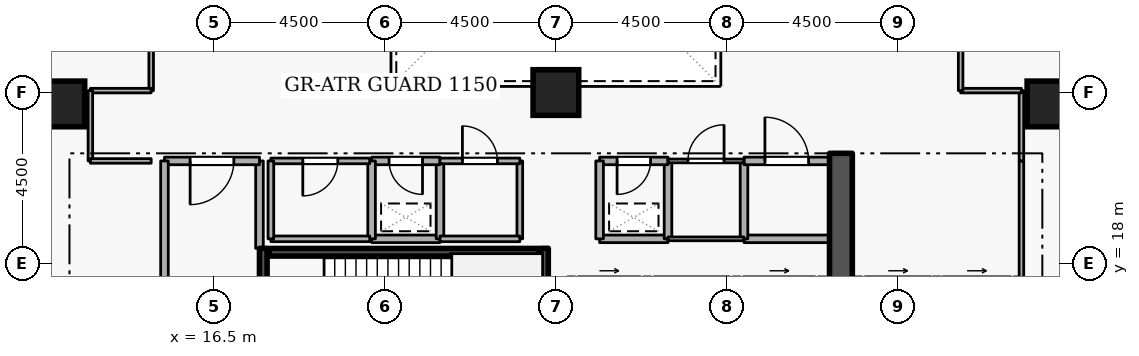
"""IFC4 building model, lengths in metres.
Left out: names, types, materials, properties, quantities, classifications, styles, units other than length and angle.
Written with IfcOpenShell. Run it as: python <this file> out.ifc"""

import sys

from ifc_helpers import new_model, si_unit, direction, frame, frame_2d, origin, origin_2d, place, context, subcontext, project, spatial, rectangle, extrude, element, fill, save


model = new_model("IFC4")
c1 = context("Model", 3, precision=1e-05, world=origin(), true_north=direction((0.0, 1.0)))
c2 = subcontext(c1, "Body", "Model", "MODEL_VIEW")
j1 = project(units=[si_unit("LENGTHUNIT", "METRE"), si_unit("PLANEANGLEUNIT", "RADIAN")], contexts=[c1])
p1 = place(None, origin())
s1 = spatial("IfcSite", under=j1, at=p1, CompositionType="ELEMENT")
p2 = place(p1, origin())
s2 = spatial("IfcBuilding", under=s1, at=p2, CompositionType="ELEMENT")
p3 = place(p2, frame((0.0, 0.0, 75.9)))
s3 = spatial("IfcBuildingStorey", under=s2, at=p3, CompositionType="ELEMENT", Elevation=75.9)
p4 = place(p3, frame((33.0, 15.2, 0.0), z_axis=(0.0, 0.0, 1.0), x_axis=(0.0, 1.0, 0.0)))
e1 = element("IfcWall", 1, at=p4, inside=s3, PredefinedType="SHEAR", context=c2, shape_type="SweptSolid", body=[
    extrude(rectangle(XDim=5.7, YDim=0.6, at=frame_2d((2.85, 0.0))), origin(), (0.0, 0.0, 1.0), 4.2),
])
for number, where, z_axis, x_axis in (
    (2, (12.5, 22.2, 0.0), (0.0, 0.0, 1.0), (1.0, 0.0, 0.0)),
    (3, (38.5, 22.2, 0.0), (0.0, 0.0, 1.0), (1.0, 0.0, 0.0)),
    (4, (25.5, 22.5, 0.0), (0.0, 0.0, 1.0), (1.0, 0.0, 0.0)),
):
    element("IfcColumn", number, at=place(p3, frame(where, z_axis=z_axis, x_axis=x_axis)), inside=s3, PredefinedType="COLUMN", context=c2, shape_type="SweptSolid", body=[
        extrude(rectangle(XDim=1.2, YDim=1.2, at=origin_2d()), origin(), (0.0, 0.0, 1.0), 4.2),
    ])
p5 = place(p3, frame((26.08, 17.55, 0.0), z_axis=(0.0, 0.0, 1.0), x_axis=(1.0, 0.0, 0.0)))
e5 = element("IfcWall", 5, at=p5, inside=s3, PredefinedType="STANDARD", context=c2, shape_type="SweptSolid", body=[
    extrude(rectangle(XDim=1.64, YDim=0.2, at=frame_2d((0.82, 0.0))), origin(), (0.0, 0.0, 1.0), 3.94),
])
p6 = place(p5, frame((0.31, 0.0, 0.0)))
e6 = element("IfcOpeningElement", 6, at=p6, cuts=e5, PredefinedType="OPENING", context=c2, shape_type="SweptSolid", body=[
    extrude(rectangle(XDim=1.02, YDim=2.06, at=frame_2d((0.51, 1.03))), frame((0.0, 0.11, 0.0), z_axis=(0.0, -1.0, 0.0), x_axis=(1.0, 0.0, 0.0)), (0.0, 0.0, 1.0), 0.22),
])
p7 = place(p3, frame((28.08, 17.55, 0.0), z_axis=(0.0, 0.0, 1.0), x_axis=(1.0, 0.0, 0.0)))
e7 = element("IfcWall", 7, at=p7, inside=s3, PredefinedType="STANDARD", context=c2, shape_type="SweptSolid", body=[
    extrude(rectangle(XDim=1.99, YDim=0.2, at=frame_2d((0.995, 0.0))), origin(), (0.0, 0.0, 1.0), 3.94),
])
p8 = place(p3, frame((30.43, 17.55, 0.0), z_axis=(0.0, 0.0, 1.0), x_axis=(1.0, 0.0, 0.0)))
e8 = element("IfcWall", 8, at=p8, inside=s3, PredefinedType="STANDARD", context=c2, shape_type="SweptSolid", body=[
    extrude(rectangle(XDim=1.89, YDim=0.2, at=frame_2d((0.945, 0.0))), origin(), (0.0, 0.0, 1.0), 3.94),
])
p9 = place(p8, frame((0.435, 0.0, 0.0)))
e9 = element("IfcOpeningElement", 9, at=p9, cuts=e8, PredefinedType="OPENING", context=c2, shape_type="SweptSolid", body=[
    extrude(rectangle(XDim=1.02, YDim=2.06, at=frame_2d((0.51, 1.03))), frame((0.0, 0.11, 0.0), z_axis=(0.0, -1.0, 0.0), x_axis=(1.0, 0.0, 0.0)), (0.0, 0.0, 1.0), 0.22),
])
p10 = place(p3, frame((33.63, 17.55, 0.0), z_axis=(0.0, 0.0, 1.0), x_axis=(1.0, 0.0, 0.0)))
e10 = element("IfcWall", 10, at=p10, inside=s3, PredefinedType="STANDARD", context=c2, shape_type="SweptSolid", body=[
    extrude(rectangle(XDim=1.74, YDim=0.2, at=frame_2d((0.87, 0.0))), origin(), (0.0, 0.0, 1.0), 3.94),
])
p11 = place(p10, frame((0.36, 0.0, 0.0)))
e11 = element("IfcOpeningElement", 11, at=p11, cuts=e10, PredefinedType="OPENING", context=c2, shape_type="SweptSolid", body=[
    extrude(rectangle(XDim=1.02, YDim=2.06, at=frame_2d((0.51, 1.03))), frame((0.0, 0.11, 0.0), z_axis=(0.0, -1.0, 0.0), x_axis=(1.0, 0.0, 0.0)), (0.0, 0.0, 1.0), 0.22),
])
p12 = place(p3, frame((35.68, 17.55, 0.0), z_axis=(0.0, 0.0, 1.0), x_axis=(1.0, 0.0, 0.0)))
e12 = element("IfcWall", 12, at=p12, inside=s3, PredefinedType="STANDARD", context=c2, shape_type="SweptSolid", body=[
    extrude(rectangle(XDim=1.79, YDim=0.2, at=frame_2d((0.895, 0.0))), origin(), (0.0, 0.0, 1.0), 3.94),
])
p13 = place(p12, frame((0.385, 0.0, 0.0)))
e13 = element("IfcOpeningElement", 13, at=p13, cuts=e12, PredefinedType="OPENING", context=c2, shape_type="SweptSolid", body=[
    extrude(rectangle(XDim=1.02, YDim=2.06, at=frame_2d((0.51, 1.03))), frame((0.0, 0.11, 0.0), z_axis=(0.0, -1.0, 0.0), x_axis=(1.0, 0.0, 0.0)), (0.0, 0.0, 1.0), 0.22),
])
p14 = place(p3, frame((17.8, 15.05, 0.0), z_axis=(0.0, 0.0, 1.0), x_axis=(0.0, 1.0, 0.0)))
e14 = element("IfcWall", 14, at=p14, inside=s3, PredefinedType="SHEAR", context=c2, shape_type="SweptSolid", body=[
    extrude(rectangle(XDim=3.35, YDim=0.2, at=frame_2d((1.675, 0.0))), origin(), (0.0, 0.0, 1.0), 4.2),
])
p15 = place(p14, frame((1.125, 0.0, 0.0)))
e15 = element("IfcOpeningElement", 15, at=p15, cuts=e14, PredefinedType="OPENING", context=c2, shape_type="SweptSolid", body=[
    extrude(rectangle(XDim=1.1, YDim=2.1, at=frame_2d((0.55, 1.05))), frame((0.0, 0.11, 0.0), z_axis=(0.0, -1.0, 0.0), x_axis=(1.0, 0.0, 0.0)), (0.0, 0.0, 1.0), 0.22),
])
p16 = place(p3, frame((25.2, 18.4, 0.0), z_axis=(0.0, 0.0, 1.0), x_axis=(0.0, -1.0, 0.0)))
e16 = element("IfcWall", 16, at=p16, inside=s3, PredefinedType="SHEAR", context=c2, shape_type="SweptSolid", body=[
    extrude(rectangle(XDim=3.35, YDim=0.2, at=frame_2d((1.675, 0.0))), origin(), (0.0, 0.0, 1.0), 4.2),
])
p17 = place(p3, frame((25.05, 18.297, 0.0), z_axis=(0.0, 0.0, 1.0), x_axis=(-1.0, 0.0, 0.0)))
e17 = element("IfcWall", 17, at=p17, inside=s3, PredefinedType="SHEAR", context=c2, shape_type="SweptSolid", body=[
    extrude(rectangle(XDim=7.1, YDim=0.2, at=frame_2d((3.55, 0.0))), origin(), (0.0, 0.0, 1.0), 4.2),
])
p18 = place(p3, frame((17.7, 18.4, 0.0), z_axis=(0.0, 0.0, 1.0), x_axis=(0.0, 1.0, 0.0)))
e18 = element("IfcWall", 18, at=p18, inside=s3, PredefinedType="STANDARD", context=c2, shape_type="SweptSolid", body=[
    extrude(rectangle(XDim=2.3, YDim=0.2, at=frame_2d((1.15, 0.0))), origin(), (0.0, 0.0, 1.0), 3.145),
])
p19 = place(p3, frame((17.7, 20.7, 0.0), z_axis=(0.0, 0.0, 1.0), x_axis=(-1.0, 0.0, 0.0)))
e19 = element("IfcWall", 19, at=p19, inside=s3, PredefinedType="STANDARD", context=c2, shape_type="SweptSolid", body=[
    extrude(rectangle(XDim=2.5, YDim=0.2, at=frame_2d((1.25, 0.0))), origin(), (0.0, 0.0, 1.0), 3.94),
])
p20 = place(p19, frame((0.675, 0.0, 0.0)))
e20 = element("IfcOpeningElement", 20, at=p20, cuts=e19, PredefinedType="OPENING", context=c2, shape_type="SweptSolid", body=[
    extrude(rectangle(XDim=1.15, YDim=2.1, at=frame_2d((0.575, 1.05))), frame((0.0, 0.11, 0.0), z_axis=(0.0, -1.0, 0.0), x_axis=(1.0, 0.0, 0.0)), (0.0, 0.0, 1.0), 0.22),
])
p21 = place(p3, frame((15.2, 20.7, 0.0), z_axis=(0.0, 0.0, 1.0), x_axis=(0.0, -1.0, 0.0)))
e21 = element("IfcWall", 21, at=p21, inside=s3, PredefinedType="STANDARD", context=c2, shape_type="SweptSolid", body=[
    extrude(rectangle(XDim=5.7, YDim=0.2, at=frame_2d((2.85, 0.0))), origin(), (0.0, 0.0, 1.0), 3.94),
])
p22 = place(p3, frame((26.65, 18.65, 0.0), z_axis=(0.0, 0.0, 1.0), x_axis=(1.0, 0.0, 0.0)))
e22 = element("IfcWall", 22, at=p22, inside=s3, PredefinedType="STANDARD", context=c2, shape_type="SweptSolid", body=[
    extrude(rectangle(XDim=1.8, YDim=0.2, at=frame_2d((0.9, 0.0))), origin(), (0.0, 0.0, 1.0), 3.94),
])
p23 = place(p3, frame((28.45, 18.65, 0.0), z_axis=(0.0, 0.0, 1.0), x_axis=(0.0, 1.0, 0.0)))
e23 = element("IfcWall", 23, at=p23, inside=s3, PredefinedType="STANDARD", context=c2, shape_type="SweptSolid", body=[
    extrude(rectangle(XDim=2.05, YDim=0.2, at=frame_2d((1.025, 0.0))), origin(), (0.0, 0.0, 1.0), 3.94),
])
p24 = place(p3, frame((28.45, 20.7, 0.0), z_axis=(0.0, 0.0, 1.0), x_axis=(-1.0, 0.0, 0.0)))
e24 = element("IfcWall", 24, at=p24, inside=s3, PredefinedType="STANDARD", context=c2, shape_type="SweptSolid", body=[
    extrude(rectangle(XDim=1.8, YDim=0.2, at=frame_2d((0.9, 0.0))), origin(), (0.0, 0.0, 1.0), 3.94),
])
p25 = place(p24, frame((0.46, 0.0, 0.0)))
e25 = element("IfcOpeningElement", 25, at=p25, cuts=e24, PredefinedType="OPENING", context=c2, shape_type="SweptSolid", body=[
    extrude(rectangle(XDim=0.88, YDim=2.04, at=frame_2d((0.44, 1.02))), frame((0.0, 0.11, 0.0), z_axis=(0.0, -1.0, 0.0), x_axis=(1.0, 0.0, 0.0)), (0.0, 0.0, 1.0), 0.22),
])
p26 = place(p3, frame((26.65, 20.7, 0.0), z_axis=(0.0, 0.0, 1.0), x_axis=(0.0, -1.0, 0.0)))
e26 = element("IfcWall", 26, at=p26, inside=s3, PredefinedType="STANDARD", context=c2, shape_type="SweptSolid", body=[
    extrude(rectangle(XDim=2.05, YDim=0.2, at=frame_2d((1.025, 0.0))), origin(), (0.0, 0.0, 1.0), 3.94),
])
p27 = place(p3, frame((20.65, 18.65, 0.0), z_axis=(0.0, 0.0, 1.0), x_axis=(1.0, 0.0, 0.0)))
e27 = element("IfcWall", 27, at=p27, inside=s3, PredefinedType="STANDARD", context=c2, shape_type="SweptSolid", body=[
    extrude(rectangle(XDim=1.8, YDim=0.2, at=frame_2d((0.9, 0.0))), origin(), (0.0, 0.0, 1.0), 3.94),
])
p28 = place(p3, frame((22.45, 18.65, 0.0), z_axis=(0.0, 0.0, 1.0), x_axis=(0.0, 1.0, 0.0)))
e28 = element("IfcWall", 28, at=p28, inside=s3, PredefinedType="STANDARD", context=c2, shape_type="SweptSolid", body=[
    extrude(rectangle(XDim=2.05, YDim=0.2, at=frame_2d((1.025, 0.0))), origin(), (0.0, 0.0, 1.0), 3.94),
])
p29 = place(p3, frame((22.45, 20.7, 0.0), z_axis=(0.0, 0.0, 1.0), x_axis=(-1.0, 0.0, 0.0)))
e29 = element("IfcWall", 29, at=p29, inside=s3, PredefinedType="STANDARD", context=c2, shape_type="SweptSolid", body=[
    extrude(rectangle(XDim=1.8, YDim=0.2, at=frame_2d((0.9, 0.0))), origin(), (0.0, 0.0, 1.0), 3.94),
])
p30 = place(p29, frame((0.46, 0.0, 0.0)))
e30 = element("IfcOpeningElement", 30, at=p30, cuts=e29, PredefinedType="OPENING", context=c2, shape_type="SweptSolid", body=[
    extrude(rectangle(XDim=0.88, YDim=2.04, at=frame_2d((0.44, 1.02))), frame((0.0, 0.11, 0.0), z_axis=(0.0, -1.0, 0.0), x_axis=(1.0, 0.0, 0.0)), (0.0, 0.0, 1.0), 0.22),
])
p31 = place(p3, frame((20.65, 20.7, 0.0), z_axis=(0.0, 0.0, 1.0), x_axis=(0.0, -1.0, 0.0)))
e31 = element("IfcWall", 31, at=p31, inside=s3, PredefinedType="STANDARD", context=c2, shape_type="SweptSolid", body=[
    extrude(rectangle(XDim=2.05, YDim=0.2, at=frame_2d((1.025, 0.0))), origin(), (0.0, 0.0, 1.0), 3.94),
])
p32 = place(p3, frame((32.7, 18.65, 0.0), z_axis=(0.0, 0.0, 1.0), x_axis=(-1.0, 0.0, 0.0)))
e32 = element("IfcWall", 32, at=p32, inside=s3, PredefinedType="STANDARD", context=c2, shape_type="SweptSolid", body=[
    extrude(rectangle(XDim=2.25, YDim=0.2, at=frame_2d((1.125, 0.0))), origin(), (0.0, 0.0, 1.0), 3.94),
])
p33 = place(p3, frame((30.45, 18.65, 0.0), z_axis=(0.0, 0.0, 1.0), x_axis=(0.0, 1.0, 0.0)))
e33 = element("IfcWall", 33, at=p33, inside=s3, PredefinedType="STANDARD", context=c2, shape_type="SweptSolid", body=[
    extrude(rectangle(XDim=2.05, YDim=0.2, at=frame_2d((1.025, 0.0))), origin(), (0.0, 0.0, 1.0), 3.94),
])
p34 = place(p3, frame((30.45, 20.7, 0.0), z_axis=(0.0, 0.0, 1.0), x_axis=(1.0, 0.0, 0.0)))
e34 = element("IfcWall", 34, at=p34, inside=s3, PredefinedType="STANDARD", context=c2, shape_type="SweptSolid", body=[
    extrude(rectangle(XDim=2.25, YDim=0.2, at=frame_2d((1.125, 0.0))), origin(), (0.0, 0.0, 1.0), 3.94),
])
p35 = place(p34, frame((0.55, 0.0, 0.0)))
e35 = element("IfcOpeningElement", 35, at=p35, cuts=e34, PredefinedType="OPENING", context=c2, shape_type="SweptSolid", body=[
    extrude(rectangle(XDim=1.15, YDim=2.1, at=frame_2d((0.575, 1.05))), frame((0.0, 0.11, 0.0), z_axis=(0.0, -1.0, 0.0), x_axis=(1.0, 0.0, 0.0)), (0.0, 0.0, 1.0), 0.22),
])
p36 = place(p3, frame((18.0, 18.65, 0.0), z_axis=(0.0, 0.0, 1.0), x_axis=(1.0, 0.0, 0.0)))
e36 = element("IfcWall", 36, at=p36, inside=s3, PredefinedType="PARTITIONING", context=c2, shape_type="SweptSolid", body=[
    extrude(rectangle(XDim=2.6, YDim=0.15, at=frame_2d((1.3, 0.0))), origin(), (0.0, 0.0, 1.0), 3.94),
])
p37 = place(p3, frame((20.6, 20.7, 0.0), z_axis=(0.0, 0.0, 1.0), x_axis=(-1.0, 0.0, 0.0)))
e37 = element("IfcWall", 37, at=p37, inside=s3, PredefinedType="PARTITIONING", context=c2, shape_type="SweptSolid", body=[
    extrude(rectangle(XDim=2.6, YDim=0.15, at=frame_2d((1.3, 0.0))), origin(), (0.0, 0.0, 1.0), 3.94),
])
p38 = place(p37, frame((0.84, 0.0, 0.0)))
e38 = element("IfcOpeningElement", 38, at=p38, cuts=e37, PredefinedType="OPENING", context=c2, shape_type="SweptSolid", body=[
    extrude(rectangle(XDim=0.92, YDim=2.08, at=frame_2d((0.46, 1.04))), frame((0.0, 0.085, 0.0), z_axis=(0.0, -1.0, 0.0), x_axis=(1.0, 0.0, 0.0)), (0.0, 0.0, 1.0), 0.17),
])
p39 = place(p3, frame((18.0, 20.7, 0.0), z_axis=(0.0, 0.0, 1.0), x_axis=(0.0, -1.0, 0.0)))
e39 = element("IfcWall", 39, at=p39, inside=s3, PredefinedType="PARTITIONING", context=c2, shape_type="SweptSolid", body=[
    extrude(rectangle(XDim=2.05, YDim=0.15, at=frame_2d((1.025, 0.0))), origin(), (0.0, 0.0, 1.0), 3.145),
])
p40 = place(p3, frame((24.55, 20.7, 0.0), z_axis=(0.0, 0.0, 1.0), x_axis=(0.0, -1.0, 0.0)))
e40 = element("IfcWall", 40, at=p40, inside=s3, PredefinedType="PARTITIONING", context=c2, shape_type="SweptSolid", body=[
    extrude(rectangle(XDim=2.05, YDim=0.15, at=frame_2d((1.025, 0.0))), origin(), (0.0, 0.0, 1.0), 3.94),
])
p41 = place(p3, frame((24.55, 18.65, 0.0), z_axis=(0.0, 0.0, 1.0), x_axis=(-1.0, 0.0, 0.0)))
e41 = element("IfcWall", 41, at=p41, inside=s3, PredefinedType="PARTITIONING", context=c2, shape_type="SweptSolid", body=[
    extrude(rectangle(XDim=2.1, YDim=0.15, at=frame_2d((1.05, 0.0))), origin(), (0.0, 0.0, 1.0), 3.94),
])
p42 = place(p3, frame((22.45, 20.7, 0.0), z_axis=(0.0, 0.0, 1.0), x_axis=(1.0, 0.0, 0.0)))
e42 = element("IfcWall", 42, at=p42, inside=s3, PredefinedType="PARTITIONING", context=c2, shape_type="SweptSolid", body=[
    extrude(rectangle(XDim=2.1, YDim=0.15, at=frame_2d((1.05, 0.0))), origin(), (0.0, 0.0, 1.0), 3.94),
])
p43 = place(p42, frame((0.59, 0.0, 0.0)))
e43 = element("IfcOpeningElement", 43, at=p43, cuts=e42, PredefinedType="OPENING", context=c2, shape_type="SweptSolid", body=[
    extrude(rectangle(XDim=0.92, YDim=2.08, at=frame_2d((0.46, 1.04))), frame((0.0, 0.085, 0.0), z_axis=(0.0, -1.0, 0.0), x_axis=(1.0, 0.0, 0.0)), (0.0, 0.0, 1.0), 0.17),
])
p44 = place(p3, frame((30.45, 18.65, 0.0), z_axis=(0.0, 0.0, 1.0), x_axis=(-1.0, 0.0, 0.0)))
e44 = element("IfcWall", 44, at=p44, inside=s3, PredefinedType="PARTITIONING", context=c2, shape_type="SweptSolid", body=[
    extrude(rectangle(XDim=2.0, YDim=0.1, at=frame_2d((1.0, 0.0))), origin(), (0.0, 0.0, 1.0), 3.94),
])
p45 = place(p3, frame((28.45, 20.7, 0.0), z_axis=(0.0, 0.0, 1.0), x_axis=(1.0, 0.0, 0.0)))
e45 = element("IfcWall", 45, at=p45, inside=s3, PredefinedType="PARTITIONING", context=c2, shape_type="SweptSolid", body=[
    extrude(rectangle(XDim=2.0, YDim=0.1, at=frame_2d((1.0, 0.0))), origin(), (0.0, 0.0, 1.0), 3.94),
])
p46 = place(p45, frame((0.525, 0.0, 0.0)))
e46 = element("IfcOpeningElement", 46, at=p46, cuts=e45, PredefinedType="OPENING", context=c2, shape_type="SweptSolid", body=[
    extrude(rectangle(XDim=0.95, YDim=2.1, at=frame_2d((0.475, 1.05))), frame((0.0, 0.06, 0.0), z_axis=(0.0, -1.0, 0.0), x_axis=(1.0, 0.0, 0.0)), (0.0, 0.0, 1.0), 0.12),
])
p47 = place(p3, frame((14.85, 27.0, 0.0), z_axis=(0.0, 0.0, 1.0), x_axis=(0.0, -1.0, 0.0)))
e47 = element("IfcWall", 47, at=p47, inside=s3, PredefinedType="PARTITIONING", context=c2, shape_type="SweptSolid", body=[
    extrude(rectangle(XDim=4.45, YDim=0.12, at=frame_2d((2.225, 0.0))), origin(), (0.0, 0.0, 1.0), 3.94),
])
p48 = place(p47, frame((1.7, 0.0, 0.0)))
e48 = element("IfcOpeningElement", 48, at=p48, cuts=e47, PredefinedType="OPENING", context=c2, shape_type="SweptSolid", body=[
    extrude(rectangle(XDim=1.05, YDim=2.1, at=frame_2d((0.525, 1.05))), frame((0.0, 0.07, 0.0), z_axis=(0.0, -1.0, 0.0), x_axis=(1.0, 0.0, 0.0)), (0.0, 0.0, 1.0), 0.14),
])
p49 = place(p3, frame((14.85, 22.55, 0.0), z_axis=(0.0, 0.0, 1.0), x_axis=(-1.0, 0.0, 0.0)))
e49 = element("IfcWall", 49, at=p49, inside=s3, PredefinedType="PARTITIONING", context=c2, shape_type="SweptSolid", body=[
    extrude(rectangle(XDim=1.6, YDim=0.12, at=frame_2d((0.8, 0.0))), origin(), (0.0, 0.0, 1.0), 3.94),
])
p50 = place(p3, frame((13.25, 22.55, 0.0), z_axis=(0.0, 0.0, 1.0), x_axis=(0.0, -1.0, 0.0)))
e50 = element("IfcWall", 50, at=p50, inside=s3, PredefinedType="PARTITIONING", context=c2, shape_type="SweptSolid", body=[
    extrude(rectangle(XDim=1.85, YDim=0.12, at=frame_2d((0.925, 0.0))), origin(), (0.0, 0.0, 1.0), 3.94),
])
p51 = place(p3, frame((13.25, 20.7, 0.0), z_axis=(0.0, 0.0, 1.0), x_axis=(1.0, 0.0, 0.0)))
e51 = element("IfcWall", 51, at=p51, inside=s3, PredefinedType="PARTITIONING", context=c2, shape_type="SweptSolid", body=[
    extrude(rectangle(XDim=1.6, YDim=0.12, at=frame_2d((0.8, 0.0))), origin(), (0.0, 0.0, 1.0), 3.94),
])
p52 = place(p3, frame((37.75, 17.55, 0.0), z_axis=(0.0, 0.0, 1.0), x_axis=(0.0, 1.0, 0.0)))
e52 = element("IfcWall", 52, at=p52, inside=s3, PredefinedType="PARTITIONING", context=c2, shape_type="SweptSolid", body=[
    extrude(rectangle(XDim=3.15, YDim=0.12, at=frame_2d((1.575, 0.0))), origin(), (0.0, 0.0, 1.0), 3.94),
])
p53 = place(p3, frame((37.75, 20.7, 0.0), z_axis=(0.0, 0.0, 1.0), x_axis=(0.0, 1.0, 0.0)))
e53 = element("IfcWall", 53, at=p53, inside=s3, PredefinedType="PARTITIONING", context=c2, shape_type="SweptSolid", body=[
    extrude(rectangle(XDim=1.85, YDim=0.12, at=frame_2d((0.925, 0.0))), origin(), (0.0, 0.0, 1.0), 3.94),
])
p54 = place(p3, frame((37.75, 22.55, 0.0), z_axis=(0.0, 0.0, 1.0), x_axis=(-1.0, 0.0, 0.0)))
e54 = element("IfcWall", 54, at=p54, inside=s3, PredefinedType="PARTITIONING", context=c2, shape_type="SweptSolid", body=[
    extrude(rectangle(XDim=1.6, YDim=0.12, at=frame_2d((0.8, 0.0))), origin(), (0.0, 0.0, 1.0), 3.94),
])
p55 = place(p3, frame((36.15, 22.55, 0.0), z_axis=(0.0, 0.0, 1.0), x_axis=(0.0, 1.0, 0.0)))
e55 = element("IfcWall", 55, at=p55, inside=s3, PredefinedType="PARTITIONING", context=c2, shape_type="SweptSolid", body=[
    extrude(rectangle(XDim=4.45, YDim=0.12, at=frame_2d((2.225, 0.0))), origin(), (0.0, 0.0, 1.0), 3.94),
])
p56 = place(p55, frame((1.7, 0.0, 0.0)))
e56 = element("IfcOpeningElement", 56, at=p56, cuts=e55, PredefinedType="OPENING", context=c2, shape_type="SweptSolid", body=[
    extrude(rectangle(XDim=1.05, YDim=2.1, at=frame_2d((0.525, 1.05))), frame((0.0, 0.07, 0.0), z_axis=(0.0, -1.0, 0.0), x_axis=(1.0, 0.0, 0.0)), (0.0, 0.0, 1.0), 0.14),
])
p57 = place(p20, origin())
e57 = element("IfcDoor", 57, at=p57, inside=s3, OperationType="SINGLE_SWING_RIGHT", PredefinedType="DOOR", context=c2, shape_type="SweptSolid", body=[
    extrude(rectangle(XDim=1.15, YDim=2.1, at=frame_2d((0.575, 1.05))), frame((0.0, 0.025, 0.0), z_axis=(0.0, -1.0, 0.0), x_axis=(1.0, 0.0, 0.0)), (0.0, 0.0, 1.0), 0.05),
])
fill(e20, e57)
p58 = place(p25, origin())
e58 = element("IfcDoor", 58, at=p58, inside=s3, OperationType="SINGLE_SWING_RIGHT", PredefinedType="DOOR", context=c2, shape_type="SweptSolid", body=[
    extrude(rectangle(XDim=0.88, YDim=2.04, at=frame_2d((0.44, 1.02))), frame((0.0, 0.025, 0.0), z_axis=(0.0, -1.0, 0.0), x_axis=(1.0, 0.0, 0.0)), (0.0, 0.0, 1.0), 0.05),
])
fill(e25, e58)
p59 = place(p30, origin())
e59 = element("IfcDoor", 59, at=p59, inside=s3, OperationType="SINGLE_SWING_LEFT", PredefinedType="DOOR", context=c2, shape_type="SweptSolid", body=[
    extrude(rectangle(XDim=0.88, YDim=2.04, at=frame_2d((0.44, 1.02))), frame((0.0, 0.025, 0.0), z_axis=(0.0, -1.0, 0.0), x_axis=(1.0, 0.0, 0.0)), (0.0, 0.0, 1.0), 0.05),
])
fill(e30, e59)
p60 = place(p38, origin())
e60 = element("IfcDoor", 60, at=p60, inside=s3, OperationType="SINGLE_SWING_RIGHT", PredefinedType="DOOR", context=c2, shape_type="SweptSolid", body=[
    extrude(rectangle(XDim=0.92, YDim=2.08, at=frame_2d((0.46, 1.04))), frame((0.0, 0.025, 0.0), z_axis=(0.0, -1.0, 0.0), x_axis=(1.0, 0.0, 0.0)), (0.0, 0.0, 1.0), 0.05),
])
fill(e38, e60)
p61 = place(p43, origin())
e61 = element("IfcDoor", 61, at=p61, inside=s3, OperationType="SINGLE_SWING_LEFT", PredefinedType="DOOR", context=c2, shape_type="SweptSolid", body=[
    extrude(rectangle(XDim=0.92, YDim=2.08, at=frame_2d((0.46, 1.04))), frame((0.0, 0.025, 0.0), z_axis=(0.0, -1.0, 0.0), x_axis=(1.0, 0.0, 0.0)), (0.0, 0.0, 1.0), 0.05),
])
fill(e43, e61)
p62 = place(p46, origin())
e62 = element("IfcDoor", 62, at=p62, inside=s3, OperationType="SINGLE_SWING_RIGHT", PredefinedType="DOOR", context=c2, shape_type="SweptSolid", body=[
    extrude(rectangle(XDim=0.95, YDim=2.1, at=frame_2d((0.475, 1.05))), frame((0.0, 0.025, 0.0), z_axis=(0.0, -1.0, 0.0), x_axis=(1.0, 0.0, 0.0)), (0.0, 0.0, 1.0), 0.05),
])
fill(e46, e62)
p63 = place(p35, origin())
e63 = element("IfcDoor", 63, at=p63, inside=s3, OperationType="SINGLE_SWING_LEFT", PredefinedType="DOOR", context=c2, shape_type="SweptSolid", body=[
    extrude(rectangle(XDim=1.15, YDim=2.1, at=frame_2d((0.575, 1.05))), frame((0.0, 0.025, 0.0), z_axis=(0.0, -1.0, 0.0), x_axis=(1.0, 0.0, 0.0)), (0.0, 0.0, 1.0), 0.05),
])
fill(e35, e63)
save(model, sys.argv[1])
